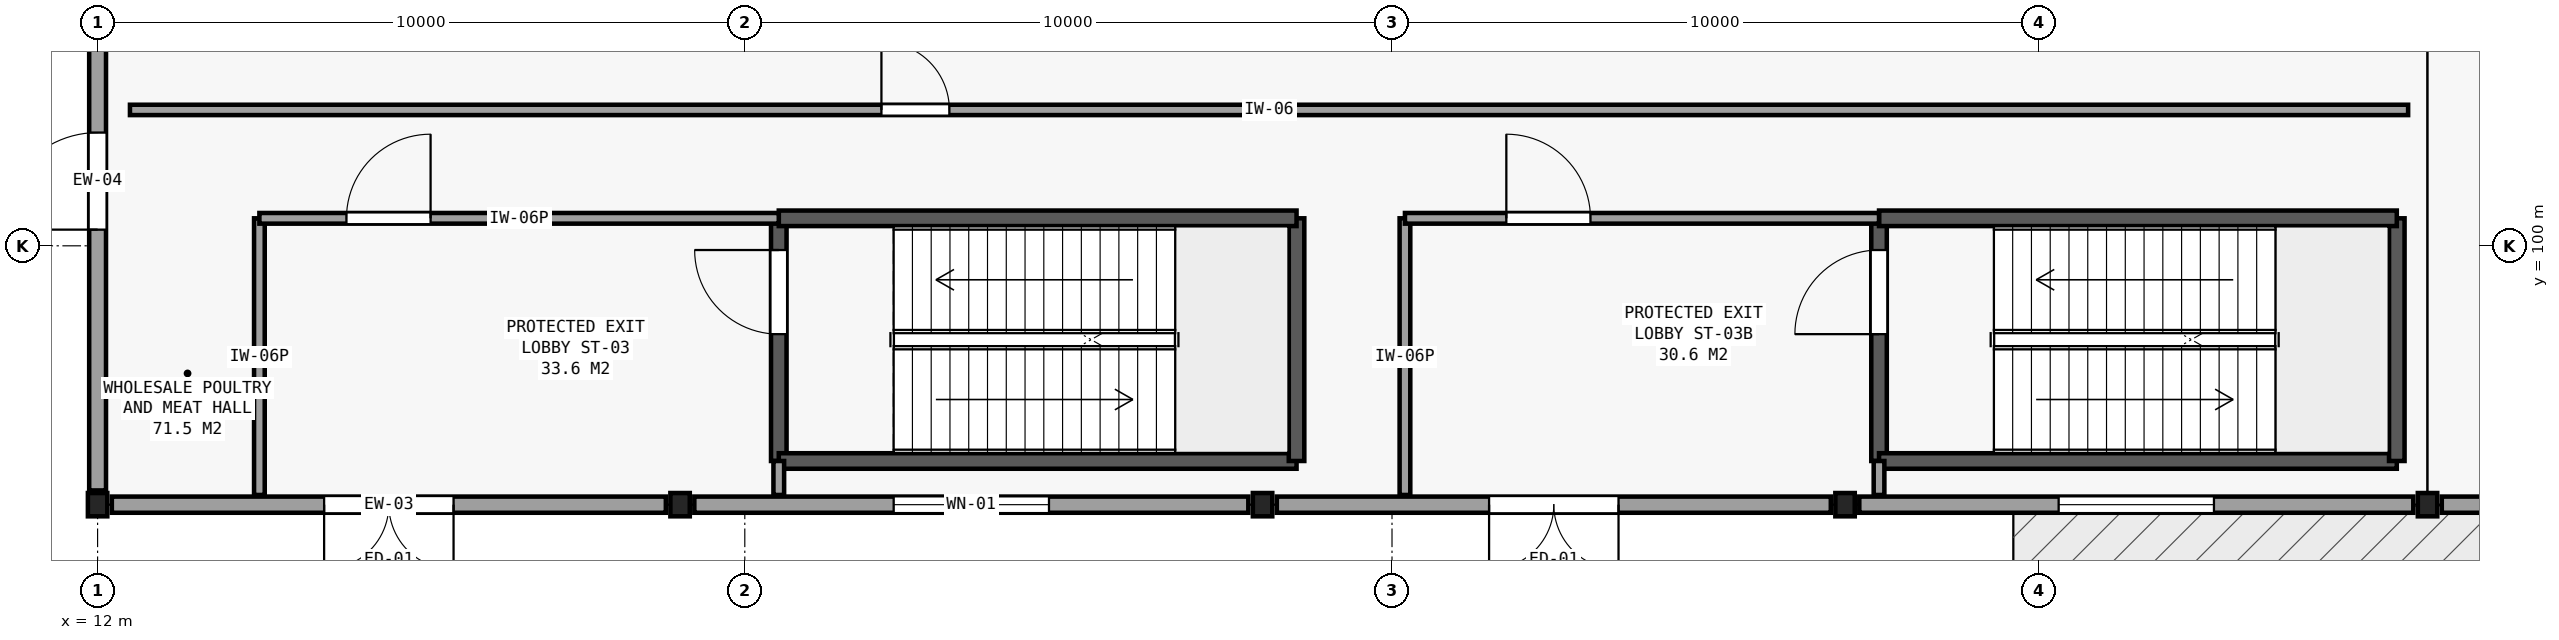
"""IFC4 building model, lengths in metres.
Left out: names, types, materials, properties, quantities, classifications, styles, units other than length and angle.
Written with IfcOpenShell. Run it as: python <this file> out.ifc"""

import sys

from ifc_helpers import new_model, si_unit, direction, frame, frame_2d, origin, origin_2d, place, context, subcontext, project, spatial, rectangle, i_section, extrude, element, fill, save


model = new_model("IFC4")
c1 = context("Model", 3, precision=1e-05, world=origin(), true_north=direction((0.0, 1.0)))
c2 = subcontext(c1, "Body", "Model", "MODEL_VIEW")
j1 = project(units=[si_unit("LENGTHUNIT", "METRE"), si_unit("PLANEANGLEUNIT", "RADIAN")], contexts=[c1])
p1 = place(None, origin())
s1 = spatial("IfcSite", under=j1, at=p1, CompositionType="ELEMENT")
p2 = place(p1, origin())
s2 = spatial("IfcBuilding", under=s1, at=p2, CompositionType="ELEMENT")
p3 = place(p2, origin())
s3 = spatial("IfcBuildingStorey", under=s2, at=p3, CompositionType="ELEMENT", Elevation=0.0)
for number, where, z_axis, x_axis in (
    (1, (12.0, 96.0, 0.0), (0.0, 0.0, 1.0), (1.0, 0.0, 0.0)),
    (2, (21.0, 96.0, 0.0), (0.0, 0.0, 1.0), (1.0, 0.0, 0.0)),
    (3, (30.0, 96.0, 0.0), (0.0, 0.0, 1.0), (1.0, 0.0, 0.0)),
    (4, (39.0, 96.0, 0.0), (0.0, 0.0, 1.0), (1.0, 0.0, 0.0)),
    (5, (48.0, 96.0, 0.0), (0.0, 0.0, 1.0), (1.0, 0.0, 0.0)),
):
    element("IfcColumn", number, at=place(p3, frame(where, z_axis=z_axis, x_axis=x_axis)), inside=s3, PredefinedType="COLUMN", context=c2, shape_type="SweptSolid", body=[
        extrude(i_section(OverallWidth=0.3, OverallDepth=0.36, WebThickness=0.012, FlangeThickness=0.022, FilletRadius=0.027, at=origin_2d()), origin(), (0.0, 0.0, 1.0), 5.4),
    ])
p4 = place(p3, frame((20.78, 96.0, 0.0), z_axis=(0.0, 0.0, 1.0), x_axis=(-1.0, 0.0, 0.0)))
e6 = element("IfcWall", 6, at=p4, inside=s3, PredefinedType="SOLIDWALL", context=c2, shape_type="SweptSolid", body=[
    extrude(rectangle(XDim=8.56, YDim=0.25, at=frame_2d((4.28, 0.0))), origin(), (0.0, 0.0, 1.0), 4.61),
])
p5 = place(p4, frame((3.28, 0.0, 0.0)))
e7 = element("IfcOpeningElement", 7, at=p5, cuts=e6, PredefinedType="OPENING", context=c2, shape_type="SweptSolid", body=[
    extrude(rectangle(XDim=2.0, YDim=2.3, at=frame_2d((1.0, 1.15))), frame((0.0, 0.135, 0.0), z_axis=(0.0, -1.0, 0.0), x_axis=(1.0, 0.0, 0.0)), (0.0, 0.0, 1.0), 0.27),
])
p6 = place(p3, frame((29.78, 96.0, 0.0), z_axis=(0.0, 0.0, 1.0), x_axis=(-1.0, 0.0, 0.0)))
e8 = element("IfcWall", 8, at=p6, inside=s3, PredefinedType="SOLIDWALL", context=c2, shape_type="SweptSolid", body=[
    extrude(rectangle(XDim=8.56, YDim=0.25, at=frame_2d((4.28, 0.0))), origin(), (0.0, 0.0, 1.0), 4.61),
])
p7 = place(p6, frame((3.08, 0.0, 2.1)))
e9 = element("IfcOpeningElement", 9, at=p7, cuts=e8, PredefinedType="OPENING", context=c2, shape_type="SweptSolid", body=[
    extrude(rectangle(XDim=2.4, YDim=1.1, at=frame_2d((1.2, 0.55))), frame((0.0, 0.135, 0.0), z_axis=(0.0, -1.0, 0.0), x_axis=(1.0, 0.0, 0.0)), (0.0, 0.0, 1.0), 0.27),
])
p8 = place(p3, frame((38.78, 96.0, 0.0), z_axis=(0.0, 0.0, 1.0), x_axis=(-1.0, 0.0, 0.0)))
e10 = element("IfcWall", 10, at=p8, inside=s3, PredefinedType="SOLIDWALL", context=c2, shape_type="SweptSolid", body=[
    extrude(rectangle(XDim=8.56, YDim=0.25, at=frame_2d((4.28, 0.0))), origin(), (0.0, 0.0, 1.0), 4.61),
])
p9 = place(p8, frame((3.28, 0.0, 0.0)))
e11 = element("IfcOpeningElement", 11, at=p9, cuts=e10, PredefinedType="OPENING", context=c2, shape_type="SweptSolid", body=[
    extrude(rectangle(XDim=2.0, YDim=2.3, at=frame_2d((1.0, 1.15))), frame((0.0, 0.135, 0.0), z_axis=(0.0, -1.0, 0.0), x_axis=(1.0, 0.0, 0.0)), (0.0, 0.0, 1.0), 0.27),
])
p10 = place(p3, frame((47.78, 96.0, 0.0), z_axis=(0.0, 0.0, 1.0), x_axis=(-1.0, 0.0, 0.0)))
e12 = element("IfcWall", 12, at=p10, inside=s3, PredefinedType="SOLIDWALL", context=c2, shape_type="SweptSolid", body=[
    extrude(rectangle(XDim=8.56, YDim=0.25, at=frame_2d((4.28, 0.0))), origin(), (0.0, 0.0, 1.0), 4.61),
])
p11 = place(p10, frame((3.08, 0.0, 2.1)))
e13 = element("IfcOpeningElement", 13, at=p11, cuts=e12, PredefinedType="OPENING", context=c2, shape_type="SweptSolid", body=[
    extrude(rectangle(XDim=2.4, YDim=1.1, at=frame_2d((1.2, 0.55))), frame((0.0, 0.135, 0.0), z_axis=(0.0, -1.0, 0.0), x_axis=(1.0, 0.0, 0.0)), (0.0, 0.0, 1.0), 0.27),
])
p12 = place(p3, frame((56.78, 96.0, 0.0), z_axis=(0.0, 0.0, 1.0), x_axis=(-1.0, 0.0, 0.0)))
e14 = element("IfcWall", 14, at=p12, inside=s3, PredefinedType="SOLIDWALL", context=c2, shape_type="SweptSolid", body=[
    extrude(rectangle(XDim=8.56, YDim=0.25, at=frame_2d((4.28, 0.0))), origin(), (0.0, 0.0, 1.0), 4.61),
])
p13 = place(p12, frame((3.08, 0.0, 2.1)))
e15 = element("IfcOpeningElement", 15, at=p13, cuts=e14, PredefinedType="OPENING", context=c2, shape_type="SweptSolid", body=[
    extrude(rectangle(XDim=2.4, YDim=1.1, at=frame_2d((1.2, 0.55))), frame((0.0, 0.135, 0.0), z_axis=(0.0, -1.0, 0.0), x_axis=(1.0, 0.0, 0.0)), (0.0, 0.0, 1.0), 0.27),
])
p14 = place(p3, frame((12.0, 96.22, 0.0), z_axis=(0.0, 0.0, 1.0), x_axis=(0.0, 1.0, 0.0)))
e16 = element("IfcWall", 16, at=p14, inside=s3, PredefinedType="SOLIDWALL", context=c2, shape_type="SweptSolid", body=[
    extrude(rectangle(XDim=9.56, YDim=0.26, at=frame_2d((4.78, 0.0))), origin(), (0.0, 0.0, 1.0), 4.71),
])
p15 = place(p14, frame((4.03, 0.0, 0.0)))
e17 = element("IfcOpeningElement", 17, at=p15, cuts=e16, PredefinedType="OPENING", context=c2, shape_type="SweptSolid", body=[
    extrude(rectangle(XDim=1.5, YDim=2.25, at=frame_2d((0.75, 1.125))), frame((0.0, 0.14, 0.0), z_axis=(0.0, -1.0, 0.0), x_axis=(1.0, 0.0, 0.0)), (0.0, 0.0, 1.0), 0.28),
])
p16 = place(p3, frame((22.525, 96.675, 0.0), z_axis=(0.0, 0.0, 1.0), x_axis=(0.0, 1.0, 0.0)))
e18 = element("IfcWall", 18, at=p16, inside=s3, PredefinedType="SOLIDWALL", context=c2, shape_type="SweptSolid", body=[
    extrude(rectangle(XDim=3.75, YDim=0.24, at=frame_2d((1.875, 0.0))), origin(), (0.0, 0.0, 1.0), 5.11),
])
p17 = place(p16, frame((1.96, 0.0, 0.0)))
e19 = element("IfcOpeningElement", 19, at=p17, cuts=e18, PredefinedType="OPENING", context=c2, shape_type="SweptSolid", body=[
    extrude(rectangle(XDim=1.3, YDim=2.15, at=frame_2d((0.65, 1.075))), frame((0.0, 0.13, 0.0), z_axis=(0.0, -1.0, 0.0), x_axis=(1.0, 0.0, 0.0)), (0.0, 0.0, 1.0), 0.26),
])
p18 = place(p3, frame((30.525, 96.675, 0.0), z_axis=(0.0, 0.0, 1.0), x_axis=(-1.0, 0.0, 0.0)))
e20 = element("IfcWall", 20, at=p18, inside=s3, PredefinedType="SOLIDWALL", context=c2, shape_type="SweptSolid", body=[
    extrude(rectangle(XDim=8.0, YDim=0.24, at=frame_2d((4.0, 0.0))), origin(), (0.0, 0.0, 1.0), 5.11),
])
p19 = place(p3, frame((30.525, 100.425, 0.0), z_axis=(0.0, 0.0, 1.0), x_axis=(0.0, -1.0, 0.0)))
e21 = element("IfcWall", 21, at=p19, inside=s3, PredefinedType="SOLIDWALL", context=c2, shape_type="SweptSolid", body=[
    extrude(rectangle(XDim=3.75, YDim=0.24, at=frame_2d((1.875, 0.0))), origin(), (0.0, 0.0, 1.0), 5.11),
])
p20 = place(p3, frame((22.525, 100.425, 0.0), z_axis=(0.0, 0.0, 1.0), x_axis=(1.0, 0.0, 0.0)))
e22 = element("IfcWall", 22, at=p20, inside=s3, PredefinedType="SOLIDWALL", context=c2, shape_type="SweptSolid", body=[
    extrude(rectangle(XDim=8.0, YDim=0.24, at=frame_2d((4.0, 0.0))), origin(), (0.0, 0.0, 1.0), 5.11),
])
p21 = place(p3, frame((39.525, 96.675, 0.0), z_axis=(0.0, 0.0, 1.0), x_axis=(0.0, 1.0, 0.0)))
e23 = element("IfcWall", 23, at=p21, inside=s3, PredefinedType="SOLIDWALL", context=c2, shape_type="SweptSolid", body=[
    extrude(rectangle(XDim=3.75, YDim=0.24, at=frame_2d((1.875, 0.0))), origin(), (0.0, 0.0, 1.0), 5.11),
])
p22 = place(p21, frame((1.96, 0.0, 0.0)))
e24 = element("IfcOpeningElement", 24, at=p22, cuts=e23, PredefinedType="OPENING", context=c2, shape_type="SweptSolid", body=[
    extrude(rectangle(XDim=1.3, YDim=2.15, at=frame_2d((0.65, 1.075))), frame((0.0, 0.13, 0.0), z_axis=(0.0, -1.0, 0.0), x_axis=(1.0, 0.0, 0.0)), (0.0, 0.0, 1.0), 0.26),
])
p23 = place(p3, frame((47.525, 96.675, 0.0), z_axis=(0.0, 0.0, 1.0), x_axis=(-1.0, 0.0, 0.0)))
e25 = element("IfcWall", 25, at=p23, inside=s3, PredefinedType="SOLIDWALL", context=c2, shape_type="SweptSolid", body=[
    extrude(rectangle(XDim=8.0, YDim=0.24, at=frame_2d((4.0, 0.0))), origin(), (0.0, 0.0, 1.0), 5.11),
])
p24 = place(p3, frame((47.525, 100.425, 0.0), z_axis=(0.0, 0.0, 1.0), x_axis=(0.0, -1.0, 0.0)))
e26 = element("IfcWall", 26, at=p24, inside=s3, PredefinedType="SOLIDWALL", context=c2, shape_type="SweptSolid", body=[
    extrude(rectangle(XDim=3.75, YDim=0.24, at=frame_2d((1.875, 0.0))), origin(), (0.0, 0.0, 1.0), 5.11),
])
p25 = place(p3, frame((39.525, 100.425, 0.0), z_axis=(0.0, 0.0, 1.0), x_axis=(1.0, 0.0, 0.0)))
e27 = element("IfcWall", 27, at=p25, inside=s3, PredefinedType="SOLIDWALL", context=c2, shape_type="SweptSolid", body=[
    extrude(rectangle(XDim=8.0, YDim=0.24, at=frame_2d((4.0, 0.0))), origin(), (0.0, 0.0, 1.0), 5.11),
])
p26 = place(p3, frame((14.5, 96.15, 0.0), z_axis=(0.0, 0.0, 1.0), x_axis=(0.0, 1.0, 0.0)))
e28 = element("IfcWall", 28, at=p26, inside=s3, PredefinedType="PARTITIONING", context=c2, shape_type="SweptSolid", body=[
    extrude(rectangle(XDim=4.275, YDim=0.165, at=frame_2d((2.138, 0.0))), origin(), (0.0, 0.0, 1.0), 5.02),
])
p27 = place(p3, frame((14.5, 100.425, 0.0), z_axis=(0.0, 0.0, 1.0), x_axis=(1.0, 0.0, 0.0)))
e29 = element("IfcWall", 29, at=p27, inside=s3, PredefinedType="PARTITIONING", context=c2, shape_type="SweptSolid", body=[
    extrude(rectangle(XDim=8.025, YDim=0.165, at=frame_2d((4.012, 0.0))), origin(), (0.0, 0.0, 1.0), 4.71),
])
p28 = place(p27, frame((1.345, 0.0, 0.0)))
e30 = element("IfcOpeningElement", 30, at=p28, cuts=e29, PredefinedType="OPENING", context=c2, shape_type="SweptSolid", body=[
    extrude(rectangle(XDim=1.3, YDim=2.15, at=frame_2d((0.65, 1.075))), frame((0.0, 0.093, 0.0), z_axis=(0.0, -1.0, 0.0), x_axis=(1.0, 0.0, 0.0)), (0.0, 0.0, 1.0), 0.185),
])
p29 = place(p3, frame((22.525, 96.15, 0.0), z_axis=(0.0, 0.0, 1.0), x_axis=(0.0, 1.0, 0.0)))
e31 = element("IfcWall", 31, at=p29, inside=s3, PredefinedType="PARTITIONING", context=c2, shape_type="SweptSolid", body=[
    extrude(rectangle(XDim=0.525, YDim=0.165, at=frame_2d((0.263, 0.0))), origin(), (0.0, 0.0, 1.0), 5.02),
])
p30 = place(p3, frame((32.2, 96.15, 0.0), z_axis=(0.0, 0.0, 1.0), x_axis=(0.0, 1.0, 0.0)))
e32 = element("IfcWall", 32, at=p30, inside=s3, PredefinedType="PARTITIONING", context=c2, shape_type="SweptSolid", body=[
    extrude(rectangle(XDim=4.275, YDim=0.165, at=frame_2d((2.138, 0.0))), origin(), (0.0, 0.0, 1.0), 5.02),
])
p31 = place(p3, frame((32.2, 100.425, 0.0), z_axis=(0.0, 0.0, 1.0), x_axis=(1.0, 0.0, 0.0)))
e33 = element("IfcWall", 33, at=p31, inside=s3, PredefinedType="PARTITIONING", context=c2, shape_type="SweptSolid", body=[
    extrude(rectangle(XDim=7.325, YDim=0.165, at=frame_2d((3.663, 0.0))), origin(), (0.0, 0.0, 1.0), 4.71),
])
p32 = place(p31, frame((1.566, 0.0, 0.0)))
e34 = element("IfcOpeningElement", 34, at=p32, cuts=e33, PredefinedType="OPENING", context=c2, shape_type="SweptSolid", body=[
    extrude(rectangle(XDim=1.3, YDim=2.15, at=frame_2d((0.65, 1.075))), frame((0.0, 0.093, 0.0), z_axis=(0.0, -1.0, 0.0), x_axis=(1.0, 0.0, 0.0)), (0.0, 0.0, 1.0), 0.185),
])
p33 = place(p3, frame((39.525, 96.15, 0.0), z_axis=(0.0, 0.0, 1.0), x_axis=(0.0, 1.0, 0.0)))
e35 = element("IfcWall", 35, at=p33, inside=s3, PredefinedType="PARTITIONING", context=c2, shape_type="SweptSolid", body=[
    extrude(rectangle(XDim=0.525, YDim=0.165, at=frame_2d((0.263, 0.0))), origin(), (0.0, 0.0, 1.0), 5.02),
])
p34 = place(p3, frame((12.5, 102.1, 0.0), z_axis=(0.0, 0.0, 1.0), x_axis=(1.0, 0.0, 0.0)))
e36 = element("IfcWall", 36, at=p34, inside=s3, PredefinedType="PARTITIONING", context=c2, shape_type="SweptSolid", body=[
    extrude(rectangle(XDim=35.2, YDim=0.16, at=frame_2d((17.6, 0.0))), origin(), (0.0, 0.0, 1.0), 4.71),
])
p35 = place(p34, frame((11.611, 0.0, 0.0)))
e37 = element("IfcOpeningElement", 37, at=p35, cuts=e36, PredefinedType="OPENING", context=c2, shape_type="SweptSolid", body=[
    extrude(rectangle(XDim=1.05, YDim=2.15, at=frame_2d((0.525, 1.075))), frame((0.0, 0.09, 0.0), z_axis=(0.0, -1.0, 0.0), x_axis=(1.0, 0.0, 0.0)), (0.0, 0.0, 1.0), 0.18),
])
p36 = place(p5, origin())
e38 = element("IfcDoor", 38, at=p36, inside=s3, OperationType="DOUBLE_DOOR_SINGLE_SWING", PredefinedType="DOOR", context=c2, shape_type="SweptSolid", body=[
    extrude(rectangle(XDim=2.0, YDim=2.3, at=frame_2d((1.0, 1.15))), frame((0.0, 0.025, 0.0), z_axis=(0.0, -1.0, 0.0), x_axis=(1.0, 0.0, 0.0)), (0.0, 0.0, 1.0), 0.05),
])
fill(e7, e38)
p37 = place(p7, origin())
e39 = element("IfcWindow", 39, at=p37, inside=s3, PartitioningType="SINGLE_PANEL", PredefinedType="WINDOW", context=c2, shape_type="SweptSolid", body=[
    extrude(rectangle(XDim=2.4, YDim=1.1, at=frame_2d((1.2, 0.55))), frame((0.0, 0.03, 0.0), z_axis=(0.0, -1.0, 0.0), x_axis=(1.0, 0.0, 0.0)), (0.0, 0.0, 1.0), 0.06),
])
fill(e9, e39)
p38 = place(p9, origin())
e40 = element("IfcDoor", 40, at=p38, inside=s3, OperationType="DOUBLE_DOOR_SINGLE_SWING", PredefinedType="DOOR", context=c2, shape_type="SweptSolid", body=[
    extrude(rectangle(XDim=2.0, YDim=2.3, at=frame_2d((1.0, 1.15))), frame((0.0, 0.025, 0.0), z_axis=(0.0, -1.0, 0.0), x_axis=(1.0, 0.0, 0.0)), (0.0, 0.0, 1.0), 0.05),
])
fill(e11, e40)
p39 = place(p11, origin())
e41 = element("IfcWindow", 41, at=p39, inside=s3, PartitioningType="SINGLE_PANEL", PredefinedType="WINDOW", context=c2, shape_type="SweptSolid", body=[
    extrude(rectangle(XDim=2.4, YDim=1.1, at=frame_2d((1.2, 0.55))), frame((0.0, 0.03, 0.0), z_axis=(0.0, -1.0, 0.0), x_axis=(1.0, 0.0, 0.0)), (0.0, 0.0, 1.0), 0.06),
])
fill(e13, e41)
p40 = place(p15, origin())
e42 = element("IfcDoor", 42, at=p40, inside=s3, OperationType="SINGLE_SWING_LEFT", PredefinedType="DOOR", context=c2, shape_type="SweptSolid", body=[
    extrude(rectangle(XDim=1.5, YDim=2.25, at=frame_2d((0.75, 1.125))), frame((0.0, 0.025, 0.0), z_axis=(0.0, -1.0, 0.0), x_axis=(1.0, 0.0, 0.0)), (0.0, 0.0, 1.0), 0.05),
])
fill(e17, e42)
p41 = place(p17, origin())
e43 = element("IfcDoor", 43, at=p41, inside=s3, OperationType="SINGLE_SWING_RIGHT", PredefinedType="DOOR", context=c2, shape_type="SweptSolid", body=[
    extrude(rectangle(XDim=1.3, YDim=2.15, at=frame_2d((0.65, 1.075))), frame((0.0, 0.025, 0.0), z_axis=(0.0, -1.0, 0.0), x_axis=(1.0, 0.0, 0.0)), (0.0, 0.0, 1.0), 0.05),
])
fill(e19, e43)
p42 = place(p22, origin())
e44 = element("IfcDoor", 44, at=p42, inside=s3, OperationType="SINGLE_SWING_LEFT", PredefinedType="DOOR", context=c2, shape_type="SweptSolid", body=[
    extrude(rectangle(XDim=1.3, YDim=2.15, at=frame_2d((0.65, 1.075))), frame((0.0, 0.025, 0.0), z_axis=(0.0, -1.0, 0.0), x_axis=(1.0, 0.0, 0.0)), (0.0, 0.0, 1.0), 0.05),
])
fill(e24, e44)
p43 = place(p28, origin())
e45 = element("IfcDoor", 45, at=p43, inside=s3, OperationType="SINGLE_SWING_RIGHT", PredefinedType="DOOR", context=c2, shape_type="SweptSolid", body=[
    extrude(rectangle(XDim=1.3, YDim=2.15, at=frame_2d((0.65, 1.075))), frame((0.0, 0.025, 0.0), z_axis=(0.0, -1.0, 0.0), x_axis=(1.0, 0.0, 0.0)), (0.0, 0.0, 1.0), 0.05),
])
fill(e30, e45)
p44 = place(p32, origin())
e46 = element("IfcDoor", 46, at=p44, inside=s3, OperationType="SINGLE_SWING_LEFT", PredefinedType="DOOR", context=c2, shape_type="SweptSolid", body=[
    extrude(rectangle(XDim=1.3, YDim=2.15, at=frame_2d((0.65, 1.075))), frame((0.0, 0.025, 0.0), z_axis=(0.0, -1.0, 0.0), x_axis=(1.0, 0.0, 0.0)), (0.0, 0.0, 1.0), 0.05),
])
fill(e34, e46)
p45 = place(p35, origin())
e47 = element("IfcDoor", 47, at=p45, inside=s3, OperationType="SINGLE_SWING_LEFT", PredefinedType="DOOR", context=c2, shape_type="SweptSolid", body=[
    extrude(rectangle(XDim=1.05, YDim=2.15, at=frame_2d((0.525, 1.075))), frame((0.0, 0.025, 0.0), z_axis=(0.0, -1.0, 0.0), x_axis=(1.0, 0.0, 0.0)), (0.0, 0.0, 1.0), 0.05),
])
fill(e37, e47)
save(model, sys.argv[1])
